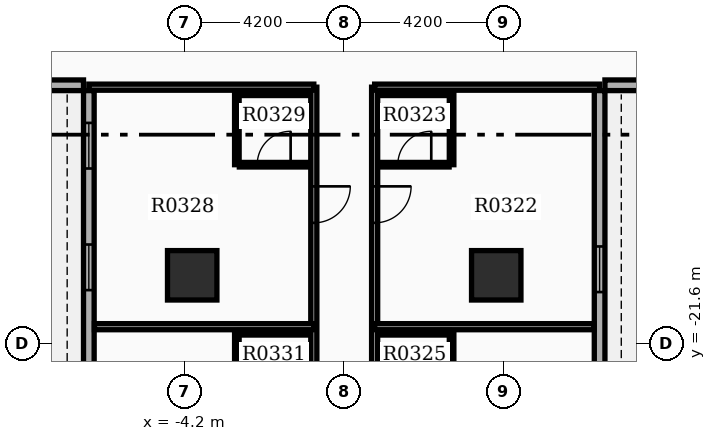
"""IFC4 building model, lengths in metres.
Left out: names, types, materials, properties, quantities, classifications, styles, units other than length and angle.
Written with IfcOpenShell. Run it as: python <this file> out.ifc"""

import sys

from ifc_helpers import new_model, si_unit, direction, frame, frame_2d, origin, origin_2d, place, context, subcontext, project, spatial, rectangle, extrude, element, fill, save


model = new_model("IFC4")
c1 = context("Model", 3, precision=1e-05, world=origin(), true_north=direction((0.0, 1.0)))
c2 = subcontext(c1, "Body", "Model", "MODEL_VIEW")
j1 = project(units=[si_unit("LENGTHUNIT", "METRE"), si_unit("PLANEANGLEUNIT", "RADIAN")], contexts=[c1])
p1 = place(None, origin())
s1 = spatial("IfcSite", under=j1, at=p1, CompositionType="ELEMENT")
p2 = place(p1, origin())
s2 = spatial("IfcBuilding", under=s1, at=p2, CompositionType="ELEMENT")
p3 = place(p2, frame((0.0, 0.0, 23.7)))
s3 = spatial("IfcBuildingStorey", under=s2, at=p3, CompositionType="ELEMENT", Elevation=23.7)
for number, where, z_axis, x_axis in (
    (1, (-4.0, -19.8, 0.0), (0.0, 0.0, 1.0), (1.0, 0.0, 0.0)),
    (2, (4.0, -19.8, 0.0), (0.0, 0.0, 1.0), (1.0, 0.0, 0.0)),
):
    element("IfcColumn", number, at=place(p3, frame(where, z_axis=z_axis, x_axis=x_axis)), inside=s3, PredefinedType="COLUMN", context=c2, shape_type="SweptSolid", body=[
        extrude(rectangle(XDim=1.3, YDim=1.3, at=origin_2d()), origin(), (0.0, 0.0, 1.0), 3.9),
    ])
p4 = place(p3, frame((-6.72, -14.94, 0.0), z_axis=(0.0, 0.0, 1.0), x_axis=(0.0, -1.0, 0.0)))
e3 = element("IfcWall", 3, at=p4, inside=s3, PredefinedType="STANDARD", context=c2, shape_type="SweptSolid", body=[
    extrude(rectangle(XDim=20.1, YDim=0.28, at=frame_2d((10.05, 0.0))), origin(), (0.0, 0.0, 1.0), 2.91),
])
p5 = place(p4, frame((0.85, 0.0, 0.8)))
e4 = element("IfcOpeningElement", 4, at=p5, cuts=e3, PredefinedType="OPENING", context=c2, shape_type="SweptSolid", body=[
    extrude(rectangle(XDim=1.2, YDim=1.6, at=frame_2d((0.6, 0.8))), frame((0.0, 0.15, 0.0), z_axis=(0.0, -1.0, 0.0), x_axis=(1.0, 0.0, 0.0)), (0.0, 0.0, 1.0), 0.3),
])
p6 = place(p4, frame((4.05, 0.0, 0.8)))
e5 = element("IfcOpeningElement", 5, at=p6, cuts=e3, PredefinedType="OPENING", context=c2, shape_type="SweptSolid", body=[
    extrude(rectangle(XDim=1.2, YDim=1.6, at=frame_2d((0.6, 0.8))), frame((0.0, 0.15, 0.0), z_axis=(0.0, -1.0, 0.0), x_axis=(1.0, 0.0, 0.0)), (0.0, 0.0, 1.0), 0.3),
])
p7 = place(p4, frame((7.25, 0.0, 0.8)))
e6 = element("IfcOpeningElement", 6, at=p7, cuts=e3, PredefinedType="OPENING", context=c2, shape_type="SweptSolid", body=[
    extrude(rectangle(XDim=1.2, YDim=1.6, at=frame_2d((0.6, 0.8))), frame((0.0, 0.15, 0.0), z_axis=(0.0, -1.0, 0.0), x_axis=(1.0, 0.0, 0.0)), (0.0, 0.0, 1.0), 0.3),
])
p8 = place(p4, frame((10.45, 0.0, 0.8)))
e7 = element("IfcOpeningElement", 7, at=p8, cuts=e3, PredefinedType="OPENING", context=c2, shape_type="SweptSolid", body=[
    extrude(rectangle(XDim=1.2, YDim=1.6, at=frame_2d((0.6, 0.8))), frame((0.0, 0.15, 0.0), z_axis=(0.0, -1.0, 0.0), x_axis=(1.0, 0.0, 0.0)), (0.0, 0.0, 1.0), 0.3),
])
p9 = place(p3, frame((6.72, -35.04, 0.0), z_axis=(0.0, 0.0, 1.0), x_axis=(0.0, 1.0, 0.0)))
e8 = element("IfcWall", 8, at=p9, inside=s3, PredefinedType="STANDARD", context=c2, shape_type="SweptSolid", body=[
    extrude(rectangle(XDim=20.1, YDim=0.28, at=frame_2d((10.05, 0.0))), origin(), (0.0, 0.0, 1.0), 2.91),
])
p10 = place(p9, frame((0.85, 0.0, 0.8)))
e9 = element("IfcOpeningElement", 9, at=p10, cuts=e8, PredefinedType="OPENING", context=c2, shape_type="SweptSolid", body=[
    extrude(rectangle(XDim=1.2, YDim=1.6, at=frame_2d((0.6, 0.8))), frame((0.0, 0.15, 0.0), z_axis=(0.0, -1.0, 0.0), x_axis=(1.0, 0.0, 0.0)), (0.0, 0.0, 1.0), 0.3),
])
p11 = place(p9, frame((4.05, 0.0, 0.8)))
e10 = element("IfcOpeningElement", 10, at=p11, cuts=e8, PredefinedType="OPENING", context=c2, shape_type="SweptSolid", body=[
    extrude(rectangle(XDim=1.2, YDim=1.6, at=frame_2d((0.6, 0.8))), frame((0.0, 0.15, 0.0), z_axis=(0.0, -1.0, 0.0), x_axis=(1.0, 0.0, 0.0)), (0.0, 0.0, 1.0), 0.3),
])
p12 = place(p9, frame((7.5, 0.0, 0.8)))
e11 = element("IfcOpeningElement", 11, at=p12, cuts=e8, PredefinedType="OPENING", context=c2, shape_type="SweptSolid", body=[
    extrude(rectangle(XDim=1.2, YDim=1.6, at=frame_2d((0.6, 0.8))), frame((0.0, 0.15, 0.0), z_axis=(0.0, -1.0, 0.0), x_axis=(1.0, 0.0, 0.0)), (0.0, 0.0, 1.0), 0.3),
])
p13 = place(p9, frame((10.7, 0.0, 0.8)))
e12 = element("IfcOpeningElement", 12, at=p13, cuts=e8, PredefinedType="OPENING", context=c2, shape_type="SweptSolid", body=[
    extrude(rectangle(XDim=1.2, YDim=1.6, at=frame_2d((0.6, 0.8))), frame((0.0, 0.15, 0.0), z_axis=(0.0, -1.0, 0.0), x_axis=(1.0, 0.0, 0.0)), (0.0, 0.0, 1.0), 0.3),
])
p14 = place(p9, frame((14.799, 0.0, 0.85)))
e13 = element("IfcOpeningElement", 13, at=p14, cuts=e8, PredefinedType="OPENING", context=c2, shape_type="SweptSolid", body=[
    extrude(rectangle(XDim=1.2, YDim=1.6, at=frame_2d((0.6, 0.8))), frame((0.0, 0.15, 0.0), z_axis=(0.0, -1.0, 0.0), x_axis=(1.0, 0.0, 0.0)), (0.0, 0.0, 1.0), 0.3),
])
for number, where, z_axis, x_axis in (
    (14, (-13.16, -14.8, 0.0), (0.0, 0.0, 1.0), (1.0, 0.0, 0.0)),
    (15, (13.16, -14.8, 0.0), (0.0, 0.0, 1.0), (-1.0, 0.0, 0.0)),
):
    element("IfcWall", number, at=place(p3, frame(where, z_axis=z_axis, x_axis=x_axis)), inside=s3, PredefinedType="STANDARD", context=c2, shape_type="SweptSolid", body=[
        extrude(rectangle(XDim=6.3, YDim=0.28, at=frame_2d((3.15, 0.0))), origin(), (0.0, 0.0, 1.0), 2.91),
    ])
p15 = place(p3, frame((0.8, -14.85, 0.0), z_axis=(0.0, 0.0, 1.0), x_axis=(0.0, -1.0, 0.0)))
e16 = element("IfcWall", 16, at=p15, inside=s3, PredefinedType="PARTITIONING", context=c2, shape_type="SweptSolid", body=[
    extrude(rectangle(XDim=20.182, YDim=0.16, at=frame_2d((10.091, 0.0))), origin(), (0.0, 0.0, 1.0), 2.9),
])
p16 = place(p15, frame((2.61, 0.0, 0.0)))
e17 = element("IfcOpeningElement", 17, at=p16, cuts=e16, PredefinedType="OPENING", context=c2, shape_type="SweptSolid", body=[
    extrude(rectangle(XDim=0.96, YDim=2.15, at=frame_2d((0.48, 1.075))), frame((0.0, 0.09, 0.0), z_axis=(0.0, -1.0, 0.0), x_axis=(1.0, 0.0, 0.0)), (0.0, 0.0, 1.0), 0.18),
])
p17 = place(p15, frame((8.994, 0.0, 0.0)))
e18 = element("IfcOpeningElement", 18, at=p17, cuts=e16, PredefinedType="OPENING", context=c2, shape_type="SweptSolid", body=[
    extrude(rectangle(XDim=0.96, YDim=2.15, at=frame_2d((0.48, 1.075))), frame((0.0, 0.09, 0.0), z_axis=(0.0, -1.0, 0.0), x_axis=(1.0, 0.0, 0.0)), (0.0, 0.0, 1.0), 0.18),
])
p18 = place(p15, frame((18.93, 0.0, 0.0)))
e19 = element("IfcOpeningElement", 19, at=p18, cuts=e16, PredefinedType="OPENING", context=c2, shape_type="SweptSolid", body=[
    extrude(rectangle(XDim=0.96, YDim=2.15, at=frame_2d((0.48, 1.075))), frame((0.0, 0.09, 0.0), z_axis=(0.0, -1.0, 0.0), x_axis=(1.0, 0.0, 0.0)), (0.0, 0.0, 1.0), 0.18),
])
p19 = place(p3, frame((0.8, -14.85, 0.0), z_axis=(0.0, 0.0, 1.0), x_axis=(1.0, 0.0, 0.0)))
e20 = element("IfcWall", 20, at=p19, inside=s3, PredefinedType="PARTITIONING", context=c2, shape_type="SweptSolid", body=[
    extrude(rectangle(XDim=5.92, YDim=0.16, at=frame_2d((2.96, 0.0))), origin(), (0.0, 0.0, 1.0), 2.9),
])
p20 = place(p3, frame((0.8, -21.152, 0.0), z_axis=(0.0, 0.0, 1.0), x_axis=(1.0, 0.0, 0.0)))
e21 = element("IfcWall", 21, at=p20, inside=s3, PredefinedType="PARTITIONING", context=c2, shape_type="SweptSolid", body=[
    extrude(rectangle(XDim=5.772, YDim=0.16, at=frame_2d((2.886, 0.0))), origin(), (0.0, 0.0, 1.0), 2.9),
])
p21 = place(p3, frame((0.94, -16.89, 0.0), z_axis=(0.0, 0.0, 1.0), x_axis=(1.0, 0.0, 0.0)))
e22 = element("IfcWall", 22, at=p21, inside=s3, PredefinedType="PARTITIONING", context=c2, shape_type="SweptSolid", body=[
    extrude(rectangle(XDim=1.82, YDim=0.12, at=frame_2d((0.91, 0.0))), origin(), (0.0, 0.0, 1.0), 2.9),
])
p22 = place(p21, frame((0.47, 0.0, 0.0)))
e23 = element("IfcOpeningElement", 23, at=p22, cuts=e22, PredefinedType="OPENING", context=c2, shape_type="SweptSolid", body=[
    extrude(rectangle(XDim=0.88, YDim=2.1, at=frame_2d((0.44, 1.05))), frame((0.0, 0.07, 0.0), z_axis=(0.0, -1.0, 0.0), x_axis=(1.0, 0.0, 0.0)), (0.0, 0.0, 1.0), 0.14),
])
p23 = place(p3, frame((0.94, -15.01, 0.0), z_axis=(0.0, 0.0, 1.0), x_axis=(1.0, 0.0, 0.0)))
e24 = element("IfcWall", 24, at=p23, inside=s3, PredefinedType="PARTITIONING", context=c2, shape_type="SweptSolid", body=[
    extrude(rectangle(XDim=1.82, YDim=0.12, at=frame_2d((0.91, 0.0))), origin(), (0.0, 0.0, 1.0), 2.9),
])
p24 = place(p3, frame((2.825, -15.01, 0.0), z_axis=(0.0, 0.0, 1.0), x_axis=(0.0, -1.0, 0.0)))
e25 = element("IfcWall", 25, at=p24, inside=s3, PredefinedType="PARTITIONING", context=c2, shape_type="SweptSolid", body=[
    extrude(rectangle(XDim=1.88, YDim=0.12, at=frame_2d((0.94, 0.0))), origin(), (0.0, 0.0, 1.0), 2.9),
])
p25 = place(p3, frame((0.94, -21.312, 0.0), z_axis=(0.0, 0.0, 1.0), x_axis=(1.0, 0.0, 0.0)))
e26 = element("IfcWall", 26, at=p25, inside=s3, PredefinedType="PARTITIONING", context=c2, shape_type="SweptSolid", body=[
    extrude(rectangle(XDim=1.82, YDim=0.12, at=frame_2d((0.91, 0.0))), origin(), (0.0, 0.0, 1.0), 2.9),
])
p26 = place(p3, frame((2.825, -21.312, 0.0), z_axis=(0.0, 0.0, 1.0), x_axis=(0.0, -1.0, 0.0)))
e27 = element("IfcWall", 27, at=p26, inside=s3, PredefinedType="PARTITIONING", context=c2, shape_type="SweptSolid", body=[
    extrude(rectangle(XDim=1.88, YDim=0.12, at=frame_2d((0.94, 0.0))), origin(), (0.0, 0.0, 1.0), 2.9),
])
p27 = place(p3, frame((-0.8, -14.85, 0.0), z_axis=(0.0, 0.0, 1.0), x_axis=(0.0, -1.0, 0.0)))
e28 = element("IfcWall", 28, at=p27, inside=s3, PredefinedType="PARTITIONING", context=c2, shape_type="SweptSolid", body=[
    extrude(rectangle(XDim=20.182, YDim=0.16, at=frame_2d((10.091, 0.0))), origin(), (0.0, 0.0, 1.0), 2.9),
])
p28 = place(p27, frame((2.61, 0.0, 0.0)))
e29 = element("IfcOpeningElement", 29, at=p28, cuts=e28, PredefinedType="OPENING", context=c2, shape_type="SweptSolid", body=[
    extrude(rectangle(XDim=0.96, YDim=2.15, at=frame_2d((0.48, 1.075))), frame((0.0, 0.09, 0.0), z_axis=(0.0, -1.0, 0.0), x_axis=(1.0, 0.0, 0.0)), (0.0, 0.0, 1.0), 0.18),
])
p29 = place(p27, frame((8.994, 0.0, 0.0)))
e30 = element("IfcOpeningElement", 30, at=p29, cuts=e28, PredefinedType="OPENING", context=c2, shape_type="SweptSolid", body=[
    extrude(rectangle(XDim=0.96, YDim=2.15, at=frame_2d((0.48, 1.075))), frame((0.0, 0.09, 0.0), z_axis=(0.0, -1.0, 0.0), x_axis=(1.0, 0.0, 0.0)), (0.0, 0.0, 1.0), 0.18),
])
p30 = place(p27, frame((18.93, 0.0, 0.0)))
e31 = element("IfcOpeningElement", 31, at=p30, cuts=e28, PredefinedType="OPENING", context=c2, shape_type="SweptSolid", body=[
    extrude(rectangle(XDim=0.96, YDim=2.15, at=frame_2d((0.48, 1.075))), frame((0.0, 0.09, 0.0), z_axis=(0.0, -1.0, 0.0), x_axis=(1.0, 0.0, 0.0)), (0.0, 0.0, 1.0), 0.18),
])
p31 = place(p3, frame((-0.8, -14.85, 0.0), z_axis=(0.0, 0.0, 1.0), x_axis=(-1.0, 0.0, 0.0)))
e32 = element("IfcWall", 32, at=p31, inside=s3, PredefinedType="PARTITIONING", context=c2, shape_type="SweptSolid", body=[
    extrude(rectangle(XDim=5.92, YDim=0.16, at=frame_2d((2.96, 0.0))), origin(), (0.0, 0.0, 1.0), 2.9),
])
p32 = place(p3, frame((-0.8, -21.152, 0.0), z_axis=(0.0, 0.0, 1.0), x_axis=(-1.0, 0.0, 0.0)))
e33 = element("IfcWall", 33, at=p32, inside=s3, PredefinedType="PARTITIONING", context=c2, shape_type="SweptSolid", body=[
    extrude(rectangle(XDim=5.772, YDim=0.16, at=frame_2d((2.886, 0.0))), origin(), (0.0, 0.0, 1.0), 2.9),
])
p33 = place(p3, frame((-2.76, -16.89, 0.0), z_axis=(0.0, 0.0, 1.0), x_axis=(1.0, 0.0, 0.0)))
e34 = element("IfcWall", 34, at=p33, inside=s3, PredefinedType="PARTITIONING", context=c2, shape_type="SweptSolid", body=[
    extrude(rectangle(XDim=1.82, YDim=0.12, at=frame_2d((0.91, 0.0))), origin(), (0.0, 0.0, 1.0), 2.9),
])
p34 = place(p33, frame((0.47, 0.0, 0.0)))
e35 = element("IfcOpeningElement", 35, at=p34, cuts=e34, PredefinedType="OPENING", context=c2, shape_type="SweptSolid", body=[
    extrude(rectangle(XDim=0.88, YDim=2.1, at=frame_2d((0.44, 1.05))), frame((0.0, 0.07, 0.0), z_axis=(0.0, -1.0, 0.0), x_axis=(1.0, 0.0, 0.0)), (0.0, 0.0, 1.0), 0.14),
])
p35 = place(p3, frame((-2.76, -15.01, 0.0), z_axis=(0.0, 0.0, 1.0), x_axis=(1.0, 0.0, 0.0)))
e36 = element("IfcWall", 36, at=p35, inside=s3, PredefinedType="PARTITIONING", context=c2, shape_type="SweptSolid", body=[
    extrude(rectangle(XDim=1.82, YDim=0.12, at=frame_2d((0.91, 0.0))), origin(), (0.0, 0.0, 1.0), 2.9),
])
p36 = place(p3, frame((-2.825, -15.01, 0.0), z_axis=(0.0, 0.0, 1.0), x_axis=(0.0, -1.0, 0.0)))
e37 = element("IfcWall", 37, at=p36, inside=s3, PredefinedType="PARTITIONING", context=c2, shape_type="SweptSolid", body=[
    extrude(rectangle(XDim=1.88, YDim=0.12, at=frame_2d((0.94, 0.0))), origin(), (0.0, 0.0, 1.0), 2.9),
])
p37 = place(p3, frame((-2.76, -21.312, 0.0), z_axis=(0.0, 0.0, 1.0), x_axis=(1.0, 0.0, 0.0)))
e38 = element("IfcWall", 38, at=p37, inside=s3, PredefinedType="PARTITIONING", context=c2, shape_type="SweptSolid", body=[
    extrude(rectangle(XDim=1.82, YDim=0.12, at=frame_2d((0.91, 0.0))), origin(), (0.0, 0.0, 1.0), 2.9),
])
p38 = place(p3, frame((-2.825, -21.312, 0.0), z_axis=(0.0, 0.0, 1.0), x_axis=(0.0, -1.0, 0.0)))
e39 = element("IfcWall", 39, at=p38, inside=s3, PredefinedType="PARTITIONING", context=c2, shape_type="SweptSolid", body=[
    extrude(rectangle(XDim=1.88, YDim=0.12, at=frame_2d((0.94, 0.0))), origin(), (0.0, 0.0, 1.0), 2.9),
])
p39 = place(p5, origin())
e40 = element("IfcWindow", 40, at=p39, inside=s3, PartitioningType="SINGLE_PANEL", PredefinedType="WINDOW", context=c2, shape_type="SweptSolid", body=[
    extrude(rectangle(XDim=1.2, YDim=1.6, at=frame_2d((0.6, 0.8))), frame((0.0, 0.03, 0.0), z_axis=(0.0, -1.0, 0.0), x_axis=(1.0, 0.0, 0.0)), (0.0, 0.0, 1.0), 0.06),
])
fill(e4, e40)
p40 = place(p6, origin())
e41 = element("IfcWindow", 41, at=p40, inside=s3, PartitioningType="SINGLE_PANEL", PredefinedType="WINDOW", context=c2, shape_type="SweptSolid", body=[
    extrude(rectangle(XDim=1.2, YDim=1.6, at=frame_2d((0.6, 0.8))), frame((0.0, 0.03, 0.0), z_axis=(0.0, -1.0, 0.0), x_axis=(1.0, 0.0, 0.0)), (0.0, 0.0, 1.0), 0.06),
])
fill(e5, e41)
p41 = place(p14, origin())
e42 = element("IfcWindow", 42, at=p41, inside=s3, PartitioningType="SINGLE_PANEL", PredefinedType="WINDOW", context=c2, shape_type="SweptSolid", body=[
    extrude(rectangle(XDim=1.2, YDim=1.6, at=frame_2d((0.6, 0.8))), frame((0.0, 0.03, 0.0), z_axis=(0.0, -1.0, 0.0), x_axis=(1.0, 0.0, 0.0)), (0.0, 0.0, 1.0), 0.06),
])
fill(e13, e42)
p42 = place(p16, origin())
e43 = element("IfcDoor", 43, at=p42, inside=s3, OperationType="SINGLE_SWING_LEFT", PredefinedType="DOOR", context=c2, shape_type="SweptSolid", body=[
    extrude(rectangle(XDim=0.96, YDim=2.15, at=frame_2d((0.48, 1.075))), frame((0.0, 0.025, 0.0), z_axis=(0.0, -1.0, 0.0), x_axis=(1.0, 0.0, 0.0)), (0.0, 0.0, 1.0), 0.05),
])
fill(e17, e43)
p43 = place(p22, origin())
e44 = element("IfcDoor", 44, at=p43, inside=s3, OperationType="SINGLE_SWING_RIGHT", PredefinedType="DOOR", context=c2, shape_type="SweptSolid", body=[
    extrude(rectangle(XDim=0.88, YDim=2.1, at=frame_2d((0.44, 1.05))), frame((0.0, 0.025, 0.0), z_axis=(0.0, -1.0, 0.0), x_axis=(1.0, 0.0, 0.0)), (0.0, 0.0, 1.0), 0.05),
])
fill(e23, e44)
p44 = place(p28, origin())
e45 = element("IfcDoor", 45, at=p44, inside=s3, OperationType="SINGLE_SWING_LEFT", PredefinedType="DOOR", context=c2, shape_type="SweptSolid", body=[
    extrude(rectangle(XDim=0.96, YDim=2.15, at=frame_2d((0.48, 1.075))), frame((0.0, 0.025, 0.0), z_axis=(0.0, -1.0, 0.0), x_axis=(1.0, 0.0, 0.0)), (0.0, 0.0, 1.0), 0.05),
])
fill(e29, e45)
p45 = place(p34, origin())
e46 = element("IfcDoor", 46, at=p45, inside=s3, OperationType="SINGLE_SWING_RIGHT", PredefinedType="DOOR", context=c2, shape_type="SweptSolid", body=[
    extrude(rectangle(XDim=0.88, YDim=2.1, at=frame_2d((0.44, 1.05))), frame((0.0, 0.025, 0.0), z_axis=(0.0, -1.0, 0.0), x_axis=(1.0, 0.0, 0.0)), (0.0, 0.0, 1.0), 0.05),
])
fill(e35, e46)
save(model, sys.argv[1])
